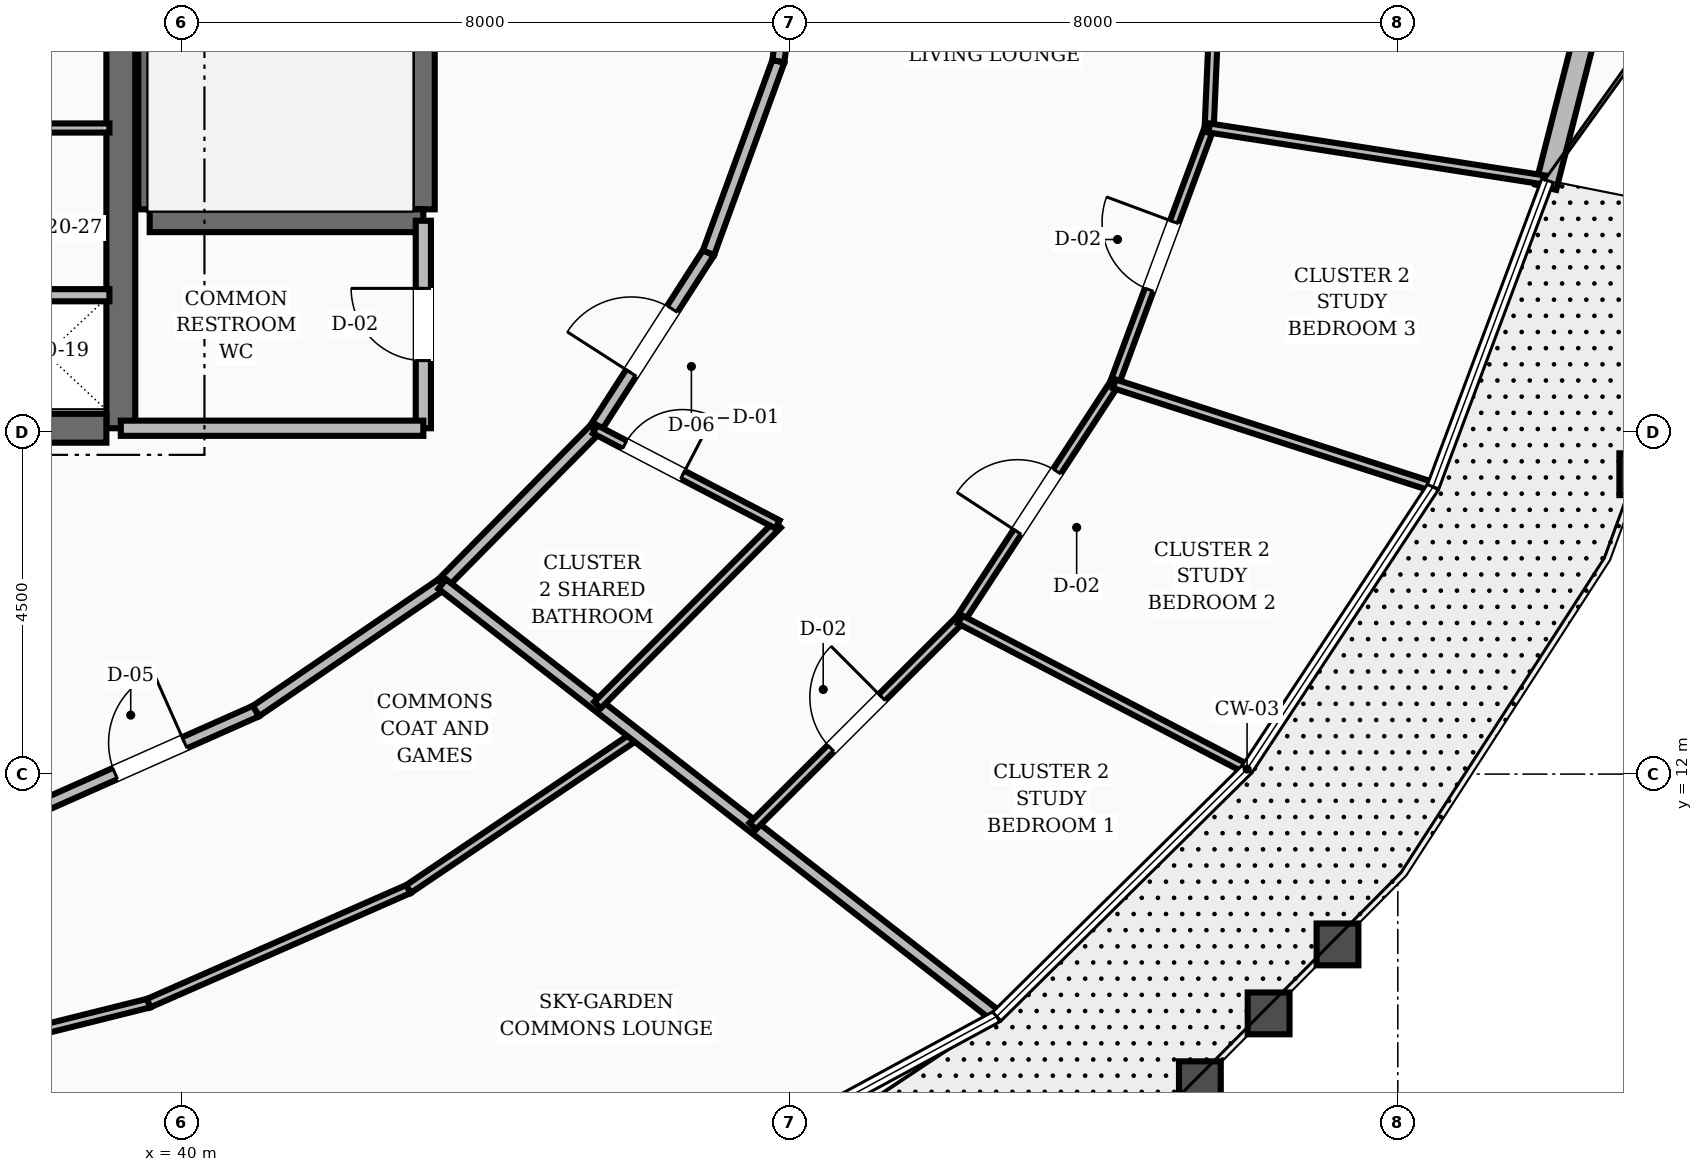
"""IFC4 building model, lengths in metres.
Left out: names, types, materials, properties, quantities, classifications, styles, units other than length and angle.
Written with IfcOpenShell. Run it as: python <this file> out.ifc"""

import sys

from ifc_helpers import new_model, si_unit, direction, frame, frame_2d, origin, place, context, subcontext, project, spatial, rectangle, extrude, element, fill, save


model = new_model("IFC4")
c1 = context("Model", 3, precision=1e-05, world=origin(), true_north=direction((0.0, 1.0)))
c2 = subcontext(c1, "Body", "Model", "MODEL_VIEW")
j1 = project(units=[si_unit("LENGTHUNIT", "METRE"), si_unit("PLANEANGLEUNIT", "RADIAN")], contexts=[c1])
p1 = place(None, origin())
s1 = spatial("IfcSite", under=j1, at=p1, CompositionType="ELEMENT")
p2 = place(p1, origin())
s2 = spatial("IfcBuilding", under=s1, at=p2, CompositionType="ELEMENT")
p3 = place(p2, frame((0.0, 0.0, 80.8)))
s3 = spatial("IfcBuildingStorey", under=s2, at=p3, CompositionType="ELEMENT", Elevation=80.8)
p4 = place(p3, frame((39.2, 16.55, 0.0), z_axis=(0.0, 0.0, 1.0), x_axis=(0.0, 1.0, 0.0)))
e1 = element("IfcWall", 1, at=p4, inside=s3, PredefinedType="SHEAR", context=c2, shape_type="SweptSolid", body=[
    extrude(rectangle(XDim=6.3, YDim=0.38, at=frame_2d((3.15, 0.0))), origin(), (0.0, 0.0, 1.0), 3.6),
])
p5 = place(p3, frame((35.8, 16.55, 0.0), z_axis=(0.0, 0.0, 1.0), x_axis=(1.0, 0.0, 0.0)))
e2 = element("IfcWall", 2, at=p5, inside=s3, PredefinedType="SHEAR", context=c2, shape_type="SweptSolid", body=[
    extrude(rectangle(XDim=3.21, YDim=0.38, at=frame_2d((1.605, 0.0))), origin(), (0.0, 0.0, 1.0), 3.6),
])
p6 = place(p5, frame((0.3, 0.0, 0.0)))
e3 = element("IfcOpeningElement", 3, at=p6, cuts=e2, PredefinedType="OPENING", context=c2, shape_type="SweptSolid", body=[
    extrude(rectangle(XDim=1.1, YDim=2.1, at=frame_2d((0.55, 1.05))), frame((0.0, 0.2, 0.0), z_axis=(0.0, -1.0, 0.0), x_axis=(1.0, 0.0, 0.0)), (0.0, 0.0, 1.0), 0.4),
])
for number, where, z_axis, x_axis in (
    (4, (43.18, 19.43, 0.0), (0.0, 0.0, 1.0), (0.0, 1.0, 0.0)),
    (5, (39.58, 19.43, 0.0), (0.0, 0.0, 1.0), (0.0, 1.0, 0.0)),
):
    element("IfcWall", number, at=place(p3, frame(where, z_axis=z_axis, x_axis=x_axis)), inside=s3, PredefinedType="SHEAR", context=c2, shape_type="SweptSolid", body=[
        extrude(rectangle(XDim=8.74, YDim=0.3, at=frame_2d((4.37, 0.0))), origin(), (0.0, 0.0, 1.0), 3.6),
    ])
p7 = place(p3, frame((39.58, 19.28, 0.0), z_axis=(0.0, 0.0, 1.0), x_axis=(1.0, 0.0, 0.0)))
e6 = element("IfcWall", 6, at=p7, inside=s3, PredefinedType="SHEAR", context=c2, shape_type="SweptSolid", body=[
    extrude(rectangle(XDim=3.6, YDim=0.3, at=frame_2d((1.8, 0.0))), origin(), (0.0, 0.0, 1.0), 3.6),
])
p8 = place(p3, frame((57.948, 19.72, 0.0), z_axis=(0.0, 0.0, 1.0), x_axis=(0.247150260181, 0.968977166342, 0.0)))
e7 = element("IfcWall", 7, at=p8, inside=s3, PredefinedType="STANDARD", context=c2, shape_type="SweptSolid", body=[
    extrude(rectangle(XDim=4.417, YDim=0.28, at=frame_2d((2.208, 0.0))), origin(), (0.0, 0.0, 1.0), 2.71),
])
p9 = place(p3, frame((43.18, 16.55, 0.0), z_axis=(0.0, 0.0, 1.0), x_axis=(0.0, 1.0, 0.0)))
e8 = element("IfcWall", 8, at=p9, inside=s3, PredefinedType="SOLIDWALL", context=c2, shape_type="SweptSolid", body=[
    extrude(rectangle(XDim=2.73, YDim=0.2, at=frame_2d((1.365, 0.0))), origin(), (0.0, 0.0, 1.0), 2.71),
])
p10 = place(p9, frame((0.89, 0.0, 0.0)))
e9 = element("IfcOpeningElement", 9, at=p10, cuts=e8, PredefinedType="OPENING", context=c2, shape_type="SweptSolid", body=[
    extrude(rectangle(XDim=0.95, YDim=2.1, at=frame_2d((0.475, 1.05))), frame((0.0, 0.11, 0.0), z_axis=(0.0, -1.0, 0.0), x_axis=(1.0, 0.0, 0.0)), (0.0, 0.0, 1.0), 0.22),
])
p11 = place(p3, frame((39.2, 16.55, 0.0), z_axis=(0.0, 0.0, 1.0), x_axis=(1.0, 0.0, 0.0)))
e10 = element("IfcWall", 10, at=p11, inside=s3, PredefinedType="SOLIDWALL", context=c2, shape_type="SweptSolid", body=[
    extrude(rectangle(XDim=3.98, YDim=0.2, at=frame_2d((1.99, 0.0))), origin(), (0.0, 0.0, 1.0), 2.71),
])
p12 = place(p3, frame((37.4, 18.3, 0.0), z_axis=(0.0, 0.0, 1.0), x_axis=(1.0, 0.0, 0.0)))
e11 = element("IfcWall", 11, at=p12, inside=s3, PredefinedType="SOLIDWALL", context=c2, shape_type="SweptSolid", body=[
    extrude(rectangle(XDim=1.65, YDim=0.16, at=frame_2d((0.825, 0.0))), origin(), (0.0, 0.0, 1.0), 2.71),
])
p13 = place(p3, frame((37.4, 20.5, 0.0), z_axis=(0.0, 0.0, 1.0), x_axis=(1.0, 0.0, 0.0)))
e12 = element("IfcWall", 12, at=p13, inside=s3, PredefinedType="PARTITIONING", context=c2, shape_type="SweptSolid", body=[
    extrude(rectangle(XDim=1.65, YDim=0.12, at=frame_2d((0.825, 0.0))), origin(), (0.0, 0.0, 1.0), 2.71),
])
p14 = place(p3, frame((38.185, 11.589, 0.0), z_axis=(0.0, 0.0, 1.0), x_axis=(0.913860932409, 0.406027334321, 0.0)))
e13 = element("IfcWall", 13, at=p14, inside=s3, PredefinedType="SOLIDWALL", context=c2, shape_type="SweptSolid", body=[
    extrude(rectangle(XDim=3.058, YDim=0.16, at=frame_2d((1.529, 0.0))), origin(), (0.0, 0.0, 1.0), 2.71),
])
p15 = place(p14, frame((1.029, 0.0, 0.0)))
e14 = element("IfcOpeningElement", 14, at=p15, cuts=e13, PredefinedType="OPENING", context=c2, shape_type="SweptSolid", body=[
    extrude(rectangle(XDim=1.0, YDim=2.1, at=frame_2d((0.5, 1.05))), frame((0.0, 0.09, 0.0), z_axis=(0.0, -1.0, 0.0), x_axis=(1.0, 0.0, 0.0)), (0.0, 0.0, 1.0), 0.18),
])
p16 = place(p3, frame((40.979, 12.83, 0.0), z_axis=(0.0, 0.0, 1.0), x_axis=(0.826112340767, 0.563505457323, 0.0)))
e15 = element("IfcWall", 15, at=p16, inside=s3, PredefinedType="SOLIDWALL", context=c2, shape_type="SweptSolid", body=[
    extrude(rectangle(XDim=2.965, YDim=0.16, at=frame_2d((1.482, 0.0))), origin(), (0.0, 0.0, 1.0), 2.71),
])
p17 = place(p3, frame((43.428, 14.501, 0.0), z_axis=(0.0, 0.0, 1.0), x_axis=(0.702569520063, 0.711615113301, 0.0)))
e16 = element("IfcWall", 16, at=p17, inside=s3, PredefinedType="SOLIDWALL", context=c2, shape_type="SweptSolid", body=[
    extrude(rectangle(XDim=2.861, YDim=0.16, at=frame_2d((1.43, 0.0))), origin(), (0.0, 0.0, 1.0), 2.71),
])
p18 = place(p3, frame((45.438, 16.537, 0.0), z_axis=(0.0, 0.0, 1.0), x_axis=(0.540891657444, 0.841092274907, 0.0)))
e17 = element("IfcWall", 17, at=p18, inside=s3, PredefinedType="SOLIDWALL", context=c2, shape_type="SweptSolid", body=[
    extrude(rectangle(XDim=2.761, YDim=0.16, at=frame_2d((1.38, 0.0))), origin(), (0.0, 0.0, 1.0), 2.71),
])
p19 = place(p18, frame((0.881, 0.0, 0.0)))
e18 = element("IfcOpeningElement", 18, at=p19, cuts=e17, PredefinedType="OPENING", context=c2, shape_type="SweptSolid", body=[
    extrude(rectangle(XDim=1.0, YDim=2.1, at=frame_2d((0.5, 1.05))), frame((0.0, 0.09, 0.0), z_axis=(0.0, -1.0, 0.0), x_axis=(1.0, 0.0, 0.0)), (0.0, 0.0, 1.0), 0.18),
])
p20 = place(p3, frame((46.932, 18.859, 0.0), z_axis=(0.0, 0.0, 1.0), x_axis=(0.342882618672, 0.939378257047, 0.0)))
e19 = element("IfcWall", 19, at=p20, inside=s3, PredefinedType="SOLIDWALL", context=c2, shape_type="SweptSolid", body=[
    extrude(rectangle(XDim=2.683, YDim=0.16, at=frame_2d((1.341, 0.0))), origin(), (0.0, 0.0, 1.0), 2.71),
])
p21 = place(p3, frame((47.852, 21.379, 0.0), z_axis=(0.0, 0.0, 1.0), x_axis=(0.117667763342, 0.993053018459, 0.0)))
e20 = element("IfcWall", 20, at=p21, inside=s3, PredefinedType="SOLIDWALL", context=c2, shape_type="SweptSolid", body=[
    extrude(rectangle(XDim=2.639, YDim=0.16, at=frame_2d((1.32, 0.0))), origin(), (0.0, 0.0, 1.0), 2.71),
])
p22 = place(p3, frame((35.857, 8.062, 0.0), z_axis=(0.0, 0.0, 1.0), x_axis=(0.970300068467, 0.241904479357, 0.0)))
e21 = element("IfcWall", 21, at=p22, inside=s3, PredefinedType="PARTITIONING", context=c2, shape_type="SweptSolid", body=[
    extrude(rectangle(XDim=3.823, YDim=0.12, at=frame_2d((1.912, 0.0))), origin(), (0.0, 0.0, 1.0), 2.71),
])
p23 = place(p3, frame((39.567, 8.987, 0.0), z_axis=(0.0, 0.0, 1.0), x_axis=(0.915553018918, 0.402197301769, 0.0)))
e22 = element("IfcWall", 22, at=p23, inside=s3, PredefinedType="PARTITIONING", context=c2, shape_type="SweptSolid", body=[
    extrude(rectangle(XDim=3.734, YDim=0.12, at=frame_2d((1.867, 0.0))), origin(), (0.0, 0.0, 1.0), 2.71),
])
p24 = place(p3, frame((42.985, 10.489, 0.0), z_axis=(0.0, 0.0, 1.0), x_axis=(0.829066303205, 0.55915030617, 0.0)))
e23 = element("IfcWall", 23, at=p24, inside=s3, PredefinedType="PARTITIONING", context=c2, shape_type="SweptSolid", body=[
    extrude(rectangle(XDim=3.615, YDim=0.12, at=frame_2d((1.807, 0.0))), origin(), (0.0, 0.0, 1.0), 2.71),
])
p25 = place(p3, frame((43.428, 14.501, 0.0), z_axis=(0.0, 0.0, 1.0), x_axis=(0.788578725625, -0.614933812285, 0.0)))
e24 = element("IfcWall", 24, at=p25, inside=s3, PredefinedType="SOLIDWALL", context=c2, shape_type="SweptSolid", body=[
    extrude(rectangle(XDim=9.202, YDim=0.16, at=frame_2d((4.601, 0.0))), origin(), (0.0, 0.0, 1.0), 2.71),
])
p26 = place(p3, frame((45.471, 12.908, 0.0), z_axis=(0.0, 0.0, 1.0), x_axis=(0.705905490377, 0.708306034604, 0.0)))
e25 = element("IfcWall", 25, at=p26, inside=s3, PredefinedType="PARTITIONING", context=c2, shape_type="SweptSolid", body=[
    extrude(rectangle(XDim=3.356, YDim=0.12, at=frame_2d((1.678, 0.0))), origin(), (0.0, 0.0, 1.0), 2.71),
])
p27 = place(p3, frame((45.438, 16.537, 0.0), z_axis=(0.0, 0.0, 1.0), x_axis=(0.886820978736, -0.462113137309, 0.0)))
e26 = element("IfcWall", 26, at=p27, inside=s3, PredefinedType="PARTITIONING", context=c2, shape_type="SweptSolid", body=[
    extrude(rectangle(XDim=2.709, YDim=0.12, at=frame_2d((1.354, 0.0))), origin(), (0.0, 0.0, 1.0), 2.71),
])
p28 = place(p27, frame((0.44, 0.0, 0.0)))
e27 = element("IfcOpeningElement", 27, at=p28, cuts=e26, PredefinedType="OPENING", context=c2, shape_type="SweptSolid", body=[
    extrude(rectangle(XDim=0.86, YDim=2.1, at=frame_2d((0.43, 1.05))), frame((0.0, 0.07, 0.0), z_axis=(0.0, -1.0, 0.0), x_axis=(1.0, 0.0, 0.0)), (0.0, 0.0, 1.0), 0.14),
])
p29 = place(p3, frame((47.514, 11.315, 0.0), z_axis=(0.0, 0.0, 1.0), x_axis=(0.708405005875, 0.705806168613, 0.0)))
e28 = element("IfcWall", 28, at=p29, inside=s3, PredefinedType="PARTITIONING", context=c2, shape_type="SweptSolid", body=[
    extrude(rectangle(XDim=3.852, YDim=0.12, at=frame_2d((1.926, 0.0))), origin(), (0.0, 0.0, 1.0), 2.71),
])
p30 = place(p29, frame((1.451, 0.0, 0.0)))
e29 = element("IfcOpeningElement", 29, at=p30, cuts=e28, PredefinedType="OPENING", context=c2, shape_type="SweptSolid", body=[
    extrude(rectangle(XDim=0.95, YDim=2.1, at=frame_2d((0.475, 1.05))), frame((0.0, 0.07, 0.0), z_axis=(0.0, -1.0, 0.0), x_axis=(1.0, 0.0, 0.0)), (0.0, 0.0, 1.0), 0.14),
])
p31 = place(p3, frame((50.242, 14.033, 0.0), z_axis=(0.0, 0.0, 1.0), x_axis=(0.547181905029, 0.837013717217, 0.0)))
e30 = element("IfcWall", 30, at=p31, inside=s3, PredefinedType="PARTITIONING", context=c2, shape_type="SweptSolid", body=[
    extrude(rectangle(XDim=3.706, YDim=0.12, at=frame_2d((1.853, 0.0))), origin(), (0.0, 0.0, 1.0), 2.71),
])
p32 = place(p31, frame((1.378, 0.0, 0.0)))
e31 = element("IfcOpeningElement", 31, at=p32, cuts=e30, PredefinedType="OPENING", context=c2, shape_type="SweptSolid", body=[
    extrude(rectangle(XDim=0.95, YDim=2.1, at=frame_2d((0.475, 1.05))), frame((0.0, 0.07, 0.0), z_axis=(0.0, -1.0, 0.0), x_axis=(1.0, 0.0, 0.0)), (0.0, 0.0, 1.0), 0.14),
])
p33 = place(p3, frame((50.242, 14.033, 0.0), z_axis=(0.0, 0.0, 1.0), x_axis=(0.886850665811, -0.462056161684, 0.0)))
e32 = element("IfcWall", 32, at=p33, inside=s3, PredefinedType="PARTITIONING", context=c2, shape_type="SweptSolid", body=[
    extrude(rectangle(XDim=4.207, YDim=0.12, at=frame_2d((2.103, 0.0))), origin(), (0.0, 0.0, 1.0), 2.71),
])
p34 = place(p3, frame((52.27, 17.135, 0.0), z_axis=(0.0, 0.0, 1.0), x_axis=(0.347819358627, 0.937561567986, 0.0)))
e33 = element("IfcWall", 33, at=p34, inside=s3, PredefinedType="PARTITIONING", context=c2, shape_type="SweptSolid", body=[
    extrude(rectangle(XDim=3.59, YDim=0.12, at=frame_2d((1.795, 0.0))), origin(), (0.0, 0.0, 1.0), 2.71),
])
p35 = place(p34, frame((1.32, 0.0, 0.0)))
e34 = element("IfcOpeningElement", 34, at=p35, cuts=e33, PredefinedType="OPENING", context=c2, shape_type="SweptSolid", body=[
    extrude(rectangle(XDim=0.95, YDim=2.1, at=frame_2d((0.475, 1.05))), frame((0.0, 0.07, 0.0), z_axis=(0.0, -1.0, 0.0), x_axis=(1.0, 0.0, 0.0)), (0.0, 0.0, 1.0), 0.14),
])
p36 = place(p3, frame((52.27, 17.135, 0.0), z_axis=(0.0, 0.0, 1.0), x_axis=(0.951594494346, -0.307356337709, 0.0)))
e35 = element("IfcWall", 35, at=p36, inside=s3, PredefinedType="PARTITIONING", context=c2, shape_type="SweptSolid", body=[
    extrude(rectangle(XDim=4.358, YDim=0.12, at=frame_2d((2.179, 0.0))), origin(), (0.0, 0.0, 1.0), 2.71),
])
p37 = place(p3, frame((53.519, 20.5, 0.0), z_axis=(0.0, 0.0, 1.0), x_axis=(0.043525670249, 0.999052308956, 0.0)))
e36 = element("IfcWall", 36, at=p37, inside=s3, PredefinedType="PARTITIONING", context=c2, shape_type="SweptSolid", body=[
    extrude(rectangle(XDim=7.067, YDim=0.12, at=frame_2d((3.534, 0.0))), origin(), (0.0, 0.0, 1.0), 2.71),
])
p38 = place(p37, frame((3.059, 0.0, 0.0)))
e37 = element("IfcOpeningElement", 37, at=p38, cuts=e36, PredefinedType="OPENING", context=c2, shape_type="SweptSolid", body=[
    extrude(rectangle(XDim=0.95, YDim=2.1, at=frame_2d((0.475, 1.05))), frame((0.0, 0.07, 0.0), z_axis=(0.0, -1.0, 0.0), x_axis=(1.0, 0.0, 0.0)), (0.0, 0.0, 1.0), 0.14),
])
p39 = place(p3, frame((53.519, 20.5, 0.0), z_axis=(0.0, 0.0, 1.0), x_axis=(0.988179628111, -0.153300432438, 0.0)))
e38 = element("IfcWall", 38, at=p39, inside=s3, PredefinedType="PARTITIONING", context=c2, shape_type="SweptSolid", body=[
    extrude(rectangle(XDim=4.456, YDim=0.12, at=frame_2d((2.228, 0.0))), origin(), (0.0, 0.0, 1.0), 2.71),
])
p40 = place(p10, origin())
e39 = element("IfcDoor", 39, at=p40, inside=s3, OperationType="SINGLE_SWING_RIGHT", PredefinedType="DOOR", context=c2, shape_type="SweptSolid", body=[
    extrude(rectangle(XDim=0.95, YDim=2.1, at=frame_2d((0.475, 1.05))), frame((0.0, 0.025, 0.0), z_axis=(0.0, -1.0, 0.0), x_axis=(1.0, 0.0, 0.0)), (0.0, 0.0, 1.0), 0.05),
])
fill(e9, e39)
p41 = place(p15, origin())
e40 = element("IfcDoor", 40, at=p41, inside=s3, OperationType="SINGLE_SWING_RIGHT", PredefinedType="DOOR", context=c2, shape_type="SweptSolid", body=[
    extrude(rectangle(XDim=1.0, YDim=2.1, at=frame_2d((0.5, 1.05))), frame((0.0, 0.025, 0.0), z_axis=(0.0, -1.0, 0.0), x_axis=(1.0, 0.0, 0.0)), (0.0, 0.0, 1.0), 0.05),
])
fill(e14, e40)
p42 = place(p28, origin())
e41 = element("IfcDoor", 41, at=p42, inside=s3, OperationType="SINGLE_SWING_RIGHT", PredefinedType="DOOR", context=c2, shape_type="SweptSolid", body=[
    extrude(rectangle(XDim=0.86, YDim=2.1, at=frame_2d((0.43, 1.05))), frame((0.0, 0.025, 0.0), z_axis=(0.0, -1.0, 0.0), x_axis=(1.0, 0.0, 0.0)), (0.0, 0.0, 1.0), 0.05),
])
fill(e27, e41)
p43 = place(p19, origin())
e42 = element("IfcDoor", 42, at=p43, inside=s3, OperationType="SINGLE_SWING_LEFT", PredefinedType="DOOR", context=c2, shape_type="SweptSolid", body=[
    extrude(rectangle(XDim=1.0, YDim=2.1, at=frame_2d((0.5, 1.05))), frame((0.0, 0.025, 0.0), z_axis=(0.0, -1.0, 0.0), x_axis=(1.0, 0.0, 0.0)), (0.0, 0.0, 1.0), 0.05),
])
fill(e18, e42)
p44 = place(p30, origin())
e43 = element("IfcDoor", 43, at=p44, inside=s3, OperationType="SINGLE_SWING_RIGHT", PredefinedType="DOOR", context=c2, shape_type="SweptSolid", body=[
    extrude(rectangle(XDim=0.95, YDim=2.1, at=frame_2d((0.475, 1.05))), frame((0.0, 0.025, 0.0), z_axis=(0.0, -1.0, 0.0), x_axis=(1.0, 0.0, 0.0)), (0.0, 0.0, 1.0), 0.05),
])
fill(e29, e43)
p45 = place(p32, origin())
e44 = element("IfcDoor", 44, at=p45, inside=s3, OperationType="SINGLE_SWING_LEFT", PredefinedType="DOOR", context=c2, shape_type="SweptSolid", body=[
    extrude(rectangle(XDim=0.95, YDim=2.1, at=frame_2d((0.475, 1.05))), frame((0.0, 0.025, 0.0), z_axis=(0.0, -1.0, 0.0), x_axis=(1.0, 0.0, 0.0)), (0.0, 0.0, 1.0), 0.05),
])
fill(e31, e44)
p46 = place(p35, origin())
e45 = element("IfcDoor", 45, at=p46, inside=s3, OperationType="SINGLE_SWING_RIGHT", PredefinedType="DOOR", context=c2, shape_type="SweptSolid", body=[
    extrude(rectangle(XDim=0.95, YDim=2.1, at=frame_2d((0.475, 1.05))), frame((0.0, 0.025, 0.0), z_axis=(0.0, -1.0, 0.0), x_axis=(1.0, 0.0, 0.0)), (0.0, 0.0, 1.0), 0.05),
])
fill(e34, e45)
save(model, sys.argv[1])
